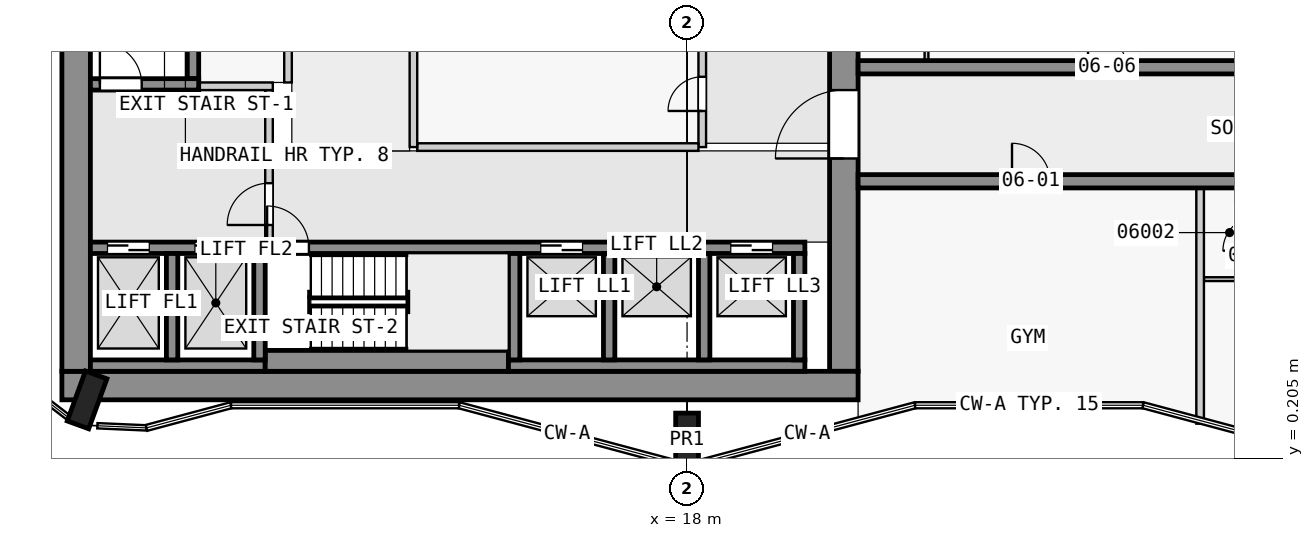
"""IFC4 building model, lengths in metres.
Left out: names, types, materials, properties, quantities, classifications, styles, units other than length and angle.
Written with IfcOpenShell. Run it as: python <this file> out.ifc"""

import sys

from ifc_helpers import new_model, si_unit, direction, frame, frame_2d, origin, origin_2d, place, context, subcontext, project, spatial, rectangle, extrude, element, fill, save


model = new_model("IFC4")
c1 = context("Model", 3, precision=1e-05, world=origin(), true_north=direction((0.0, 1.0)))
c2 = subcontext(c1, "Body", "Model", "MODEL_VIEW")
j1 = project(units=[si_unit("LENGTHUNIT", "METRE"), si_unit("PLANEANGLEUNIT", "RADIAN")], contexts=[c1])
p1 = place(None, origin())
s1 = spatial("IfcSite", under=j1, at=p1, CompositionType="ELEMENT")
p2 = place(p1, origin())
s2 = spatial("IfcBuilding", under=s1, at=p2, CompositionType="ELEMENT")
p3 = place(p2, frame((0.0, 0.0, 30.3)))
s3 = spatial("IfcBuildingStorey", under=s2, at=p3, CompositionType="ELEMENT", Elevation=30.3)
for number, where, z_axis, x_axis in (
    (1, (18.0, 0.7, 0.0), (0.0, 0.0, 1.0), (1.0, 0.0, 0.0)),
    (2, (2.213, 1.748, 0.0), (0.0, 0.0, 1.0), (-0.94, 0.342, 0.0)),
):
    element("IfcColumn", number, at=place(p3, frame(where, z_axis=z_axis, x_axis=x_axis)), inside=s3, PredefinedType="COLUMN", context=c2, shape_type="SweptSolid", body=[
        extrude(rectangle(XDim=0.6, YDim=1.4, at=origin_2d()), origin(), (0.0, 0.0, 1.0), 3.5),
    ])
p4 = place(p3, frame((1.55, 2.125, 0.0), z_axis=(0.0, 0.0, 1.0), x_axis=(1.0, 0.0, 0.0)))
e3 = element("IfcWall", 3, at=p4, inside=s3, PredefinedType="SHEAR", context=c2, shape_type="SweptSolid", body=[
    extrude(rectangle(XDim=20.95, YDim=0.75, at=frame_2d((10.475, 0.0))), origin(), (0.0, 0.0, 1.0), 3.25),
])
p5 = place(p3, frame((1.925, 2.5, 0.0), z_axis=(0.0, 0.0, 1.0), x_axis=(0.0, 1.0, 0.0)))
e4 = element("IfcWall", 4, at=p5, inside=s3, PredefinedType="SHEAR", context=c2, shape_type="SweptSolid", body=[
    extrude(rectangle(XDim=14.75, YDim=0.75, at=frame_2d((7.375, 0.0))), origin(), (0.0, 0.0, 1.0), 3.25),
])
p6 = place(p3, frame((22.125, 2.5, 0.0), z_axis=(0.0, 0.0, 1.0), x_axis=(0.0, 1.0, 0.0)))
e5 = element("IfcWall", 5, at=p6, inside=s3, PredefinedType="SHEAR", context=c2, shape_type="SweptSolid", body=[
    extrude(rectangle(XDim=14.75, YDim=0.75, at=frame_2d((7.375, 0.0))), origin(), (0.0, 0.0, 1.0), 3.25),
])
p7 = place(p6, frame((5.6, 0.0, 0.0)))
e6 = element("IfcOpeningElement", 6, at=p7, cuts=e5, PredefinedType="OPENING", context=c2, shape_type="SweptSolid", body=[
    extrude(rectangle(XDim=1.8, YDim=2.1, at=frame_2d((0.9, 1.05))), frame((0.0, 0.385, 0.0), z_axis=(0.0, -1.0, 0.0), x_axis=(1.0, 0.0, 0.0)), (0.0, 0.0, 1.0), 0.77),
])
p8 = place(p3, frame((2.3, 2.65, 0.0), z_axis=(0.0, 0.0, 1.0), x_axis=(1.0, 0.0, 0.0)))
e7 = element("IfcWall", 7, at=p8, inside=s3, PredefinedType="SHEAR", context=c2, shape_type="SweptSolid", body=[
    extrude(rectangle(XDim=4.6, YDim=0.3, at=frame_2d((2.3, 0.0))), origin(), (0.0, 0.0, 1.0), 3.25),
])
p9 = place(p3, frame((6.9, 2.775, 0.0), z_axis=(0.0, 0.0, 1.0), x_axis=(1.0, 0.0, 0.0)))
e8 = element("IfcWall", 8, at=p9, inside=s3, PredefinedType="SHEAR", context=c2, shape_type="SweptSolid", body=[
    extrude(rectangle(XDim=6.4, YDim=0.55, at=frame_2d((3.2, 0.0))), origin(), (0.0, 0.0, 1.0), 3.25),
])
p10 = place(p3, frame((13.3, 2.65, 0.0), z_axis=(0.0, 0.0, 1.0), x_axis=(1.0, 0.0, 0.0)))
e9 = element("IfcWall", 9, at=p10, inside=s3, PredefinedType="SHEAR", context=c2, shape_type="SweptSolid", body=[
    extrude(rectangle(XDim=7.8, YDim=0.3, at=frame_2d((3.9, 0.0))), origin(), (0.0, 0.0, 1.0), 3.25),
])
for number, where, z_axis, x_axis in (
    (10, (4.45, 2.8, 0.0), (0.0, 0.0, 1.0), (0.0, 1.0, 0.0)),
    (11, (6.75, 2.8, 0.0), (0.0, 0.0, 1.0), (0.0, 1.0, 0.0)),
    (12, (13.45, 2.8, 0.0), (0.0, 0.0, 1.0), (0.0, 1.0, 0.0)),
    (13, (15.95, 2.8, 0.0), (0.0, 0.0, 1.0), (0.0, 1.0, 0.0)),
    (14, (18.45, 2.8, 0.0), (0.0, 0.0, 1.0), (0.0, 1.0, 0.0)),
    (15, (20.95, 2.8, 0.0), (0.0, 0.0, 1.0), (0.0, 1.0, 0.0)),
):
    element("IfcWall", number, at=place(p3, frame(where, z_axis=z_axis, x_axis=x_axis)), inside=s3, PredefinedType="SHEAR", context=c2, shape_type="SweptSolid", body=[
        extrude(rectangle(XDim=2.8, YDim=0.3, at=frame_2d((1.4, 0.0))), origin(), (0.0, 0.0, 1.0), 3.25),
    ])
p11 = place(p3, frame((2.3, 5.75, 0.0), z_axis=(0.0, 0.0, 1.0), x_axis=(1.0, 0.0, 0.0)))
e16 = element("IfcWall", 16, at=p11, inside=s3, PredefinedType="SHEAR", context=c2, shape_type="SweptSolid", body=[
    extrude(rectangle(XDim=18.8, YDim=0.3, at=frame_2d((9.4, 0.0))), origin(), (0.0, 0.0, 1.0), 3.25),
])
p12 = place(p11, frame((4.65, 0.0, 0.0)))
e17 = element("IfcOpeningElement", 17, at=p12, cuts=e16, PredefinedType="OPENING", context=c2, shape_type="SweptSolid", body=[
    extrude(rectangle(XDim=1.1, YDim=2.1, at=frame_2d((0.55, 1.05))), frame((0.0, 0.16, 0.0), z_axis=(0.0, -1.0, 0.0), x_axis=(1.0, 0.0, 0.0)), (0.0, 0.0, 1.0), 0.32),
])
p13 = place(p11, frame((0.45, 0.0, 0.0)))
e18 = element("IfcOpeningElement", 18, at=p13, cuts=e16, PredefinedType="OPENING", context=c2, shape_type="SweptSolid", body=[
    extrude(rectangle(XDim=1.1, YDim=2.1, at=frame_2d((0.55, 1.05))), frame((0.0, 0.16, 0.0), z_axis=(0.0, -1.0, 0.0), x_axis=(1.0, 0.0, 0.0)), (0.0, 0.0, 1.0), 0.32),
])
p14 = place(p11, frame((2.75, 0.0, 0.0)))
e19 = element("IfcOpeningElement", 19, at=p14, cuts=e16, PredefinedType="OPENING", context=c2, shape_type="SweptSolid", body=[
    extrude(rectangle(XDim=1.1, YDim=2.1, at=frame_2d((0.55, 1.05))), frame((0.0, 0.16, 0.0), z_axis=(0.0, -1.0, 0.0), x_axis=(1.0, 0.0, 0.0)), (0.0, 0.0, 1.0), 0.32),
])
p15 = place(p11, frame((11.85, 0.0, 0.0)))
e20 = element("IfcOpeningElement", 20, at=p15, cuts=e16, PredefinedType="OPENING", context=c2, shape_type="SweptSolid", body=[
    extrude(rectangle(XDim=1.1, YDim=2.1, at=frame_2d((0.55, 1.05))), frame((0.0, 0.16, 0.0), z_axis=(0.0, -1.0, 0.0), x_axis=(1.0, 0.0, 0.0)), (0.0, 0.0, 1.0), 0.32),
])
p16 = place(p11, frame((14.35, 0.0, 0.0)))
e21 = element("IfcOpeningElement", 21, at=p16, cuts=e16, PredefinedType="OPENING", context=c2, shape_type="SweptSolid", body=[
    extrude(rectangle(XDim=1.1, YDim=2.1, at=frame_2d((0.55, 1.05))), frame((0.0, 0.16, 0.0), z_axis=(0.0, -1.0, 0.0), x_axis=(1.0, 0.0, 0.0)), (0.0, 0.0, 1.0), 0.32),
])
p17 = place(p11, frame((16.85, 0.0, 0.0)))
e22 = element("IfcOpeningElement", 22, at=p17, cuts=e16, PredefinedType="OPENING", context=c2, shape_type="SweptSolid", body=[
    extrude(rectangle(XDim=1.1, YDim=2.1, at=frame_2d((0.55, 1.05))), frame((0.0, 0.16, 0.0), z_axis=(0.0, -1.0, 0.0), x_axis=(1.0, 0.0, 0.0)), (0.0, 0.0, 1.0), 0.32),
])
p18 = place(p3, frame((2.3, 10.05, 0.0), z_axis=(0.0, 0.0, 1.0), x_axis=(1.0, 0.0, 0.0)))
e23 = element("IfcWall", 23, at=p18, inside=s3, PredefinedType="SHEAR", context=c2, shape_type="SweptSolid", body=[
    extrude(rectangle(XDim=2.85, YDim=0.3, at=frame_2d((1.425, 0.0))), origin(), (0.0, 0.0, 1.0), 3.25),
])
p19 = place(p18, frame((0.25, 0.0, 0.0)))
e24 = element("IfcOpeningElement", 24, at=p19, cuts=e23, PredefinedType="OPENING", context=c2, shape_type="SweptSolid", body=[
    extrude(rectangle(XDim=1.1, YDim=2.1, at=frame_2d((0.55, 1.05))), frame((0.0, 0.16, 0.0), z_axis=(0.0, -1.0, 0.0), x_axis=(1.0, 0.0, 0.0)), (0.0, 0.0, 1.0), 0.32),
])
p20 = place(p3, frame((5.0, 10.2, 0.0), z_axis=(0.0, 0.0, 1.0), x_axis=(0.0, 1.0, 0.0)))
e25 = element("IfcWall", 25, at=p20, inside=s3, PredefinedType="SHEAR", context=c2, shape_type="SweptSolid", body=[
    extrude(rectangle(XDim=6.4, YDim=0.3, at=frame_2d((3.2, 0.0))), origin(), (0.0, 0.0, 1.0), 3.25),
])
p21 = place(p3, frame((22.5, 7.5, 0.0), z_axis=(0.0, 0.0, 1.0), x_axis=(1.0, 0.0, 0.0)))
e26 = element("IfcWall", 26, at=p21, inside=s3, PredefinedType="SHEAR", context=c2, shape_type="SweptSolid", body=[
    extrude(rectangle(XDim=22.5, YDim=0.35, at=frame_2d((11.25, 0.0))), origin(), (0.0, 0.0, 1.0), 3.25),
])
p22 = place(p21, frame((4.05, 0.0, 0.0)))
e27 = element("IfcOpeningElement", 27, at=p22, cuts=e26, PredefinedType="OPENING", context=c2, shape_type="SweptSolid", body=[
    extrude(rectangle(XDim=1.0, YDim=2.1, at=frame_2d((0.5, 1.05))), frame((0.0, 0.185, 0.0), z_axis=(0.0, -1.0, 0.0), x_axis=(1.0, 0.0, 0.0)), (0.0, 0.0, 1.0), 0.37),
])
p23 = place(p21, frame((10.75, 0.0, 0.0)))
e28 = element("IfcOpeningElement", 28, at=p23, cuts=e26, PredefinedType="OPENING", context=c2, shape_type="SweptSolid", body=[
    extrude(rectangle(XDim=1.0, YDim=2.1, at=frame_2d((0.5, 1.05))), frame((0.0, 0.185, 0.0), z_axis=(0.0, -1.0, 0.0), x_axis=(1.0, 0.0, 0.0)), (0.0, 0.0, 1.0), 0.37),
])
p24 = place(p21, frame((15.25, 0.0, 0.0)))
e29 = element("IfcOpeningElement", 29, at=p24, cuts=e26, PredefinedType="OPENING", context=c2, shape_type="SweptSolid", body=[
    extrude(rectangle(XDim=1.0, YDim=2.1, at=frame_2d((0.5, 1.05))), frame((0.0, 0.185, 0.0), z_axis=(0.0, -1.0, 0.0), x_axis=(1.0, 0.0, 0.0)), (0.0, 0.0, 1.0), 0.37),
])
p25 = place(p21, frame((18.75, 0.0, 0.0)))
e30 = element("IfcOpeningElement", 30, at=p25, cuts=e26, PredefinedType="OPENING", context=c2, shape_type="SweptSolid", body=[
    extrude(rectangle(XDim=0.9, YDim=2.1, at=frame_2d((0.45, 1.05))), frame((0.0, 0.185, 0.0), z_axis=(0.0, -1.0, 0.0), x_axis=(1.0, 0.0, 0.0)), (0.0, 0.0, 1.0), 0.37),
])
p26 = place(p21, frame((20.95, 0.0, 0.0)))
e31 = element("IfcOpeningElement", 31, at=p26, cuts=e26, PredefinedType="OPENING", context=c2, shape_type="SweptSolid", body=[
    extrude(rectangle(XDim=1.0, YDim=2.1, at=frame_2d((0.5, 1.05))), frame((0.0, 0.185, 0.0), z_axis=(0.0, -1.0, 0.0), x_axis=(1.0, 0.0, 0.0)), (0.0, 0.0, 1.0), 0.37),
])
p27 = place(p3, frame((22.5, 10.5, 0.0), z_axis=(0.0, 0.0, 1.0), x_axis=(1.0, 0.0, 0.0)))
e32 = element("IfcWall", 32, at=p27, inside=s3, PredefinedType="SHEAR", context=c2, shape_type="SweptSolid", body=[
    extrude(rectangle(XDim=22.5, YDim=0.35, at=frame_2d((11.25, 0.0))), origin(), (0.0, 0.0, 1.0), 3.25),
])
p28 = place(p27, frame((6.05, 0.0, 0.0)))
e33 = element("IfcOpeningElement", 33, at=p28, cuts=e32, PredefinedType="OPENING", context=c2, shape_type="SweptSolid", body=[
    extrude(rectangle(XDim=1.0, YDim=2.1, at=frame_2d((0.5, 1.05))), frame((0.0, 0.185, 0.0), z_axis=(0.0, -1.0, 0.0), x_axis=(1.0, 0.0, 0.0)), (0.0, 0.0, 1.0), 0.37),
])
p29 = place(p27, frame((15.25, 0.0, 0.0)))
e34 = element("IfcOpeningElement", 34, at=p29, cuts=e32, PredefinedType="OPENING", context=c2, shape_type="SweptSolid", body=[
    extrude(rectangle(XDim=1.0, YDim=2.1, at=frame_2d((0.5, 1.05))), frame((0.0, 0.185, 0.0), z_axis=(0.0, -1.0, 0.0), x_axis=(1.0, 0.0, 0.0)), (0.0, 0.0, 1.0), 0.37),
])
p30 = place(p27, frame((19.75, 0.0, 0.0)))
e35 = element("IfcOpeningElement", 35, at=p30, cuts=e32, PredefinedType="OPENING", context=c2, shape_type="SweptSolid", body=[
    extrude(rectangle(XDim=1.0, YDim=2.1, at=frame_2d((0.5, 1.05))), frame((0.0, 0.185, 0.0), z_axis=(0.0, -1.0, 0.0), x_axis=(1.0, 0.0, 0.0)), (0.0, 0.0, 1.0), 0.37),
])
p31 = place(p3, frame((7.0, 5.9, 0.0), z_axis=(0.0, 0.0, 1.0), x_axis=(0.0, 1.0, 0.0)))
e36 = element("IfcWall", 36, at=p31, inside=s3, PredefinedType="PARTITIONING", context=c2, shape_type="SweptSolid", body=[
    extrude(rectangle(XDim=4.0, YDim=0.2, at=frame_2d((2.0, 0.0))), origin(), (0.0, 0.0, 1.0), 3.25),
])
p32 = place(p31, frame((0.45, 0.0, 0.0)))
e37 = element("IfcOpeningElement", 37, at=p32, cuts=e36, PredefinedType="OPENING", context=c2, shape_type="SweptSolid", body=[
    extrude(rectangle(XDim=1.1, YDim=2.1, at=frame_2d((0.55, 1.05))), frame((0.0, 0.11, 0.0), z_axis=(0.0, -1.0, 0.0), x_axis=(1.0, 0.0, 0.0)), (0.0, 0.0, 1.0), 0.22),
])
p33 = place(p3, frame((5.15, 10.0, 0.0), z_axis=(0.0, 0.0, 1.0), x_axis=(1.0, 0.0, 0.0)))
e38 = element("IfcWall", 38, at=p33, inside=s3, PredefinedType="PARTITIONING", context=c2, shape_type="SweptSolid", body=[
    extrude(rectangle(XDim=1.95, YDim=0.2, at=frame_2d((0.975, 0.0))), origin(), (0.0, 0.0, 1.0), 3.25),
])
p34 = place(p3, frame((10.8, 8.4, 0.0), z_axis=(0.0, 0.0, 1.0), x_axis=(0.0, 1.0, 0.0)))
e39 = element("IfcWall", 39, at=p34, inside=s3, PredefinedType="PARTITIONING", context=c2, shape_type="SweptSolid", body=[
    extrude(rectangle(XDim=6.2, YDim=0.2, at=frame_2d((3.1, 0.0))), origin(), (0.0, 0.0, 1.0), 3.25),
])
p35 = place(p3, frame((10.9, 8.4, 0.0), z_axis=(0.0, 0.0, 1.0), x_axis=(1.0, 0.0, 0.0)))
e40 = element("IfcWall", 40, at=p35, inside=s3, PredefinedType="PARTITIONING", context=c2, shape_type="SweptSolid", body=[
    extrude(rectangle(XDim=7.4, YDim=0.2, at=frame_2d((3.7, 0.0))), origin(), (0.0, 0.0, 1.0), 3.25),
])
p36 = place(p3, frame((18.4, 8.4, 0.0), z_axis=(0.0, 0.0, 1.0), x_axis=(0.0, 1.0, 0.0)))
e41 = element("IfcWall", 41, at=p36, inside=s3, PredefinedType="PARTITIONING", context=c2, shape_type="SweptSolid", body=[
    extrude(rectangle(XDim=6.2, YDim=0.2, at=frame_2d((3.1, 0.0))), origin(), (0.0, 0.0, 1.0), 3.25),
])
p37 = place(p36, frame((0.95, 0.0, 0.0)))
e42 = element("IfcOpeningElement", 42, at=p37, cuts=e41, PredefinedType="OPENING", context=c2, shape_type="SweptSolid", body=[
    extrude(rectangle(XDim=0.9, YDim=2.1, at=frame_2d((0.45, 1.05))), frame((0.0, 0.11, 0.0), z_axis=(0.0, -1.0, 0.0), x_axis=(1.0, 0.0, 0.0)), (0.0, 0.0, 1.0), 0.22),
])
p38 = place(p36, frame((4.05, 0.0, 0.0)))
e43 = element("IfcOpeningElement", 43, at=p38, cuts=e41, PredefinedType="OPENING", context=c2, shape_type="SweptSolid", body=[
    extrude(rectangle(XDim=0.9, YDim=2.1, at=frame_2d((0.45, 1.05))), frame((0.0, 0.11, 0.0), z_axis=(0.0, -1.0, 0.0), x_axis=(1.0, 0.0, 0.0)), (0.0, 0.0, 1.0), 0.22),
])
p39 = place(p3, frame((7.5, 10.1, 0.0), z_axis=(0.0, 0.0, 1.0), x_axis=(0.0, 1.0, 0.0)))
e44 = element("IfcWall", 44, at=p39, inside=s3, PredefinedType="PARTITIONING", context=c2, shape_type="SweptSolid", body=[
    extrude(rectangle(XDim=7.15, YDim=0.2, at=frame_2d((3.575, 0.0))), origin(), (0.0, 0.0, 1.0), 3.25),
])
p40 = place(p39, frame((1.05, 0.0, 0.0)))
e45 = element("IfcOpeningElement", 45, at=p40, cuts=e44, PredefinedType="OPENING", context=c2, shape_type="SweptSolid", body=[
    extrude(rectangle(XDim=0.9, YDim=2.1, at=frame_2d((0.45, 1.05))), frame((0.0, 0.11, 0.0), z_axis=(0.0, -1.0, 0.0), x_axis=(1.0, 0.0, 0.0)), (0.0, 0.0, 1.0), 0.22),
])
p41 = place(p39, frame((4.625, 0.0, 0.0)))
e46 = element("IfcOpeningElement", 46, at=p41, cuts=e44, PredefinedType="OPENING", context=c2, shape_type="SweptSolid", body=[
    extrude(rectangle(XDim=0.9, YDim=2.1, at=frame_2d((0.45, 1.05))), frame((0.0, 0.11, 0.0), z_axis=(0.0, -1.0, 0.0), x_axis=(1.0, 0.0, 0.0)), (0.0, 0.0, 1.0), 0.22),
])
p42 = place(p3, frame((31.6, 4.925, 0.0), z_axis=(0.0, 0.0, 1.0), x_axis=(1.0, 0.0, 0.0)))
e47 = element("IfcWall", 47, at=p42, inside=s3, PredefinedType="PARTITIONING", context=c2, shape_type="SweptSolid", body=[
    extrude(rectangle(XDim=1.35, YDim=0.1, at=frame_2d((0.675, 0.0))), origin(), (0.0, 0.0, 1.0), 3.25),
])
p43 = place(p3, frame((24.3, 10.675, 0.0), z_axis=(0.0, 0.0, 1.0), x_axis=(0.0, 1.0, 0.0)))
e48 = element("IfcWall", 48, at=p43, inside=s3, PredefinedType="PARTITIONING", context=c2, shape_type="SweptSolid", body=[
    extrude(rectangle(XDim=2.4, YDim=0.1, at=frame_2d((1.2, 0.0))), origin(), (0.0, 0.0, 1.0), 3.25),
])
p44 = place(p43, frame((0.75, 0.0, 0.0)))
e49 = element("IfcOpeningElement", 49, at=p44, cuts=e48, PredefinedType="OPENING", context=c2, shape_type="SweptSolid", body=[
    extrude(rectangle(XDim=0.9, YDim=2.1, at=frame_2d((0.45, 1.05))), frame((0.0, 0.06, 0.0), z_axis=(0.0, -1.0, 0.0), x_axis=(1.0, 0.0, 0.0)), (0.0, 0.0, 1.0), 0.12),
])
p45 = place(p3, frame((31.5, 1.122, 0.0), z_axis=(0.0, 0.0, 1.0), x_axis=(0.0, 1.0, 0.0)))
e50 = element("IfcWall", 50, at=p45, inside=s3, PredefinedType="PARTITIONING", context=c2, shape_type="SweptSolid", body=[
    extrude(rectangle(XDim=6.203, YDim=0.2, at=frame_2d((3.101, 0.0))), origin(), (0.0, 0.0, 1.0), 3.25),
])
p46 = place(p32, origin())
e51 = element("IfcDoor", 51, at=p46, inside=s3, OperationType="SINGLE_SWING_LEFT", PredefinedType="DOOR", context=c2, shape_type="SweptSolid", body=[
    extrude(rectangle(XDim=1.1, YDim=2.1, at=frame_2d((0.55, 1.05))), frame((0.0, 0.025, 0.0), z_axis=(0.0, -1.0, 0.0), x_axis=(1.0, 0.0, 0.0)), (0.0, 0.0, 1.0), 0.05),
])
fill(e37, e51)
p47 = place(p19, origin())
e52 = element("IfcDoor", 52, at=p47, inside=s3, OperationType="SINGLE_SWING_RIGHT", PredefinedType="DOOR", context=c2, shape_type="SweptSolid", body=[
    extrude(rectangle(XDim=1.1, YDim=2.1, at=frame_2d((0.55, 1.05))), frame((0.0, 0.025, 0.0), z_axis=(0.0, -1.0, 0.0), x_axis=(1.0, 0.0, 0.0)), (0.0, 0.0, 1.0), 0.05),
])
fill(e24, e52)
p48 = place(p37, origin())
e53 = element("IfcDoor", 53, at=p48, inside=s3, OperationType="SINGLE_SWING_LEFT", PredefinedType="DOOR", context=c2, shape_type="SweptSolid", body=[
    extrude(rectangle(XDim=0.9, YDim=2.1, at=frame_2d((0.45, 1.05))), frame((0.0, 0.025, 0.0), z_axis=(0.0, -1.0, 0.0), x_axis=(1.0, 0.0, 0.0)), (0.0, 0.0, 1.0), 0.05),
])
fill(e42, e53)
p49 = place(p12, origin())
e54 = element("IfcDoor", 54, at=p49, inside=s3, OperationType="SINGLE_SWING_LEFT", PredefinedType="DOOR", context=c2, shape_type="SweptSolid", body=[
    extrude(rectangle(XDim=1.1, YDim=2.1, at=frame_2d((0.55, 1.05))), frame((0.0, 0.025, 0.0), z_axis=(0.0, -1.0, 0.0), x_axis=(1.0, 0.0, 0.0)), (0.0, 0.0, 1.0), 0.05),
])
fill(e17, e54)
p50 = place(p13, origin())
e55 = element("IfcDoor", 55, at=p50, inside=s3, OperationType="DOUBLE_DOOR_SLIDING", PredefinedType="DOOR", context=c2, shape_type="SweptSolid", body=[
    extrude(rectangle(XDim=1.1, YDim=2.1, at=frame_2d((0.55, 1.05))), frame((0.0, 0.025, 0.0), z_axis=(0.0, -1.0, 0.0), x_axis=(1.0, 0.0, 0.0)), (0.0, 0.0, 1.0), 0.05),
])
fill(e18, e55)
p51 = place(p14, origin())
e56 = element("IfcDoor", 56, at=p51, inside=s3, OperationType="DOUBLE_DOOR_SLIDING", PredefinedType="DOOR", context=c2, shape_type="SweptSolid", body=[
    extrude(rectangle(XDim=1.1, YDim=2.1, at=frame_2d((0.55, 1.05))), frame((0.0, 0.025, 0.0), z_axis=(0.0, -1.0, 0.0), x_axis=(1.0, 0.0, 0.0)), (0.0, 0.0, 1.0), 0.05),
])
fill(e19, e56)
p52 = place(p15, origin())
e57 = element("IfcDoor", 57, at=p52, inside=s3, OperationType="DOUBLE_DOOR_SLIDING", PredefinedType="DOOR", context=c2, shape_type="SweptSolid", body=[
    extrude(rectangle(XDim=1.1, YDim=2.1, at=frame_2d((0.55, 1.05))), frame((0.0, 0.025, 0.0), z_axis=(0.0, -1.0, 0.0), x_axis=(1.0, 0.0, 0.0)), (0.0, 0.0, 1.0), 0.05),
])
fill(e20, e57)
p53 = place(p16, origin())
e58 = element("IfcDoor", 58, at=p53, inside=s3, OperationType="DOUBLE_DOOR_SLIDING", PredefinedType="DOOR", context=c2, shape_type="SweptSolid", body=[
    extrude(rectangle(XDim=1.1, YDim=2.1, at=frame_2d((0.55, 1.05))), frame((0.0, 0.025, 0.0), z_axis=(0.0, -1.0, 0.0), x_axis=(1.0, 0.0, 0.0)), (0.0, 0.0, 1.0), 0.05),
])
fill(e21, e58)
p54 = place(p17, origin())
e59 = element("IfcDoor", 59, at=p54, inside=s3, OperationType="DOUBLE_DOOR_SLIDING", PredefinedType="DOOR", context=c2, shape_type="SweptSolid", body=[
    extrude(rectangle(XDim=1.1, YDim=2.1, at=frame_2d((0.55, 1.05))), frame((0.0, 0.025, 0.0), z_axis=(0.0, -1.0, 0.0), x_axis=(1.0, 0.0, 0.0)), (0.0, 0.0, 1.0), 0.05),
])
fill(e22, e59)
p55 = place(p7, origin())
e60 = element("IfcDoor", 60, at=p55, inside=s3, OperationType="DOUBLE_DOOR_SINGLE_SWING", PredefinedType="DOOR", context=c2, shape_type="SweptSolid", body=[
    extrude(rectangle(XDim=1.8, YDim=2.1, at=frame_2d((0.9, 1.05))), frame((0.0, 0.025, 0.0), z_axis=(0.0, -1.0, 0.0), x_axis=(1.0, 0.0, 0.0)), (0.0, 0.0, 1.0), 0.05),
])
fill(e6, e60)
p56 = place(p22, origin())
e61 = element("IfcDoor", 61, at=p56, inside=s3, OperationType="SINGLE_SWING_LEFT", PredefinedType="DOOR", context=c2, shape_type="SweptSolid", body=[
    extrude(rectangle(XDim=1.0, YDim=2.1, at=frame_2d((0.5, 1.05))), frame((0.0, 0.025, 0.0), z_axis=(0.0, -1.0, 0.0), x_axis=(1.0, 0.0, 0.0)), (0.0, 0.0, 1.0), 0.05),
])
fill(e27, e61)
p57 = place(p28, origin())
e62 = element("IfcDoor", 62, at=p57, inside=s3, OperationType="SINGLE_SWING_LEFT", PredefinedType="DOOR", context=c2, shape_type="SweptSolid", body=[
    extrude(rectangle(XDim=1.0, YDim=2.1, at=frame_2d((0.5, 1.05))), frame((0.0, 0.025, 0.0), z_axis=(0.0, -1.0, 0.0), x_axis=(1.0, 0.0, 0.0)), (0.0, 0.0, 1.0), 0.05),
])
fill(e33, e62)
save(model, sys.argv[1])
